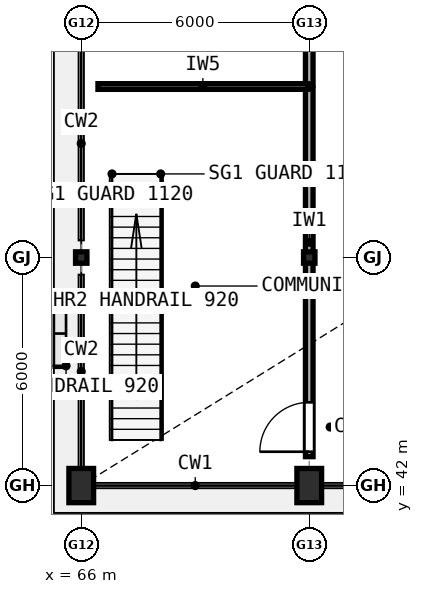
"""IFC4 building model, lengths in metres.
Left out: names, types, materials, properties, quantities, classifications, styles, units other than length and angle.
Written with IfcOpenShell. Run it as: python <this file> out.ifc"""

import sys

from ifc_helpers import new_model, si_unit, direction, frame, frame_2d, origin, origin_2d, place, context, subcontext, project, spatial, rectangle, i_section, extrude, element, fill, save


model = new_model("IFC4")
c1 = context("Model", 3, precision=1e-05, world=origin(), true_north=direction((0.0, 1.0)))
c2 = subcontext(c1, "Body", "Model", "MODEL_VIEW")
j1 = project(units=[si_unit("LENGTHUNIT", "METRE"), si_unit("PLANEANGLEUNIT", "RADIAN")], contexts=[c1])
p1 = place(None, origin())
s1 = spatial("IfcSite", under=j1, at=p1, CompositionType="ELEMENT")
p2 = place(p1, origin())
s2 = spatial("IfcBuilding", under=s1, at=p2, CompositionType="ELEMENT")
p3 = place(p2, origin())
s3 = spatial("IfcBuildingStorey", under=s2, at=p3, CompositionType="ELEMENT", Elevation=0.0)
p4 = place(p3, frame((66.0, 42.0, 0.0), z_axis=(0.0, 0.0, 1.0), x_axis=(1.0, 0.0, 0.0)))
e1 = element("IfcColumn", 1, at=p4, inside=s3, PredefinedType="COLUMN", context=c2, shape_type="SweptSolid", body=[
    extrude(rectangle(XDim=0.65, YDim=0.9, at=origin_2d()), origin(), (0.0, 0.0, 1.0), 4.23),
])
p5 = place(p3, frame((66.0, 48.0, 0.0), z_axis=(0.0, 0.0, 1.0), x_axis=(1.0, 0.0, 0.0)))
e2 = element("IfcColumn", 2, at=p5, inside=s3, PredefinedType="COLUMN", context=c2, shape_type="SweptSolid", body=[
    extrude(i_section(OverallWidth=0.3, OverallDepth=0.3, WebThickness=0.011, FlangeThickness=0.019, FilletRadius=0.027, at=origin_2d()), origin(), (0.0, 0.0, 1.0), 4.23),
])
p6 = place(p3, frame((72.0, 42.0, 0.0), z_axis=(0.0, 0.0, 1.0), x_axis=(1.0, 0.0, 0.0)))
e3 = element("IfcColumn", 3, at=p6, inside=s3, PredefinedType="COLUMN", context=c2, shape_type="SweptSolid", body=[
    extrude(rectangle(XDim=0.65, YDim=0.9, at=origin_2d()), origin(), (0.0, 0.0, 1.0), 4.23),
])
p7 = place(p3, frame((72.0, 48.0, 0.0), z_axis=(0.0, 0.0, 1.0), x_axis=(1.0, 0.0, 0.0)))
e4 = element("IfcColumn", 4, at=p7, inside=s3, PredefinedType="COLUMN", context=c2, shape_type="SweptSolid", body=[
    extrude(i_section(OverallWidth=0.3, OverallDepth=0.3, WebThickness=0.011, FlangeThickness=0.019, FilletRadius=0.027, at=origin_2d()), origin(), (0.0, 0.0, 1.0), 4.23),
])
p8 = place(p3, frame((72.0, 42.76, 0.0), z_axis=(0.0, 0.0, 1.0), x_axis=(0.0, 1.0, 0.0)))
e5 = element("IfcWall", 5, at=p8, inside=s3, PredefinedType="SOLIDWALL", context=c2, shape_type="SweptSolid", body=[
    extrude(rectangle(XDim=9.7, YDim=0.2, at=frame_2d((4.85, 0.0))), origin(), (0.0, 0.0, 1.0), 3.612),
])
p9 = place(p8, frame((0.13, 0.0, 0.0)))
e6 = element("IfcOpeningElement", 6, at=p9, cuts=e5, PredefinedType="OPENING", context=c2, shape_type="SweptSolid", body=[
    extrude(rectangle(XDim=1.3, YDim=2.15, at=frame_2d((0.65, 1.075))), frame((0.0, 0.11, 0.0), z_axis=(0.0, -1.0, 0.0), x_axis=(1.0, 0.0, 0.0)), (0.0, 0.0, 1.0), 0.22),
])
p10 = place(p3, frame((72.0, 52.54, 0.0), z_axis=(0.0, 0.0, 1.0), x_axis=(0.0, 1.0, 0.0)))
e7 = element("IfcWall", 7, at=p10, inside=s3, PredefinedType="SOLIDWALL", context=c2, shape_type="SweptSolid", body=[
    extrude(rectangle(XDim=5.92, YDim=0.2, at=frame_2d((2.96, 0.0))), origin(), (0.0, 0.0, 1.0), 3.612),
])
p11 = place(p10, frame((2.535, 0.0, 0.0)))
e8 = element("IfcOpeningElement", 8, at=p11, cuts=e7, PredefinedType="OPENING", context=c2, shape_type="SweptSolid", body=[
    extrude(rectangle(XDim=0.85, YDim=2.1, at=frame_2d((0.425, 1.05))), frame((0.0, 0.11, 0.0), z_axis=(0.0, -1.0, 0.0), x_axis=(1.0, 0.0, 0.0)), (0.0, 0.0, 1.0), 0.22),
])
p12 = place(p3, frame((66.44, 52.5, 0.0), z_axis=(0.0, 0.0, 1.0), x_axis=(1.0, 0.0, 0.0)))
e9 = element("IfcWall", 9, at=p12, inside=s3, PredefinedType="PARTITIONING", context=c2, shape_type="SweptSolid", body=[
    extrude(rectangle(XDim=5.52, YDim=0.15, at=frame_2d((2.76, 0.0))), origin(), (0.0, 0.0, 1.0), 3.612),
])
p13 = place(p9, origin())
e10 = element("IfcDoor", 10, at=p13, inside=s3, OperationType="SINGLE_SWING_LEFT", PredefinedType="DOOR", context=c2, shape_type="SweptSolid", body=[
    extrude(rectangle(XDim=1.3, YDim=2.15, at=frame_2d((0.65, 1.075))), frame((0.0, 0.025, 0.0), z_axis=(0.0, -1.0, 0.0), x_axis=(1.0, 0.0, 0.0)), (0.0, 0.0, 1.0), 0.05),
])
fill(e6, e10)
save(model, sys.argv[1])
